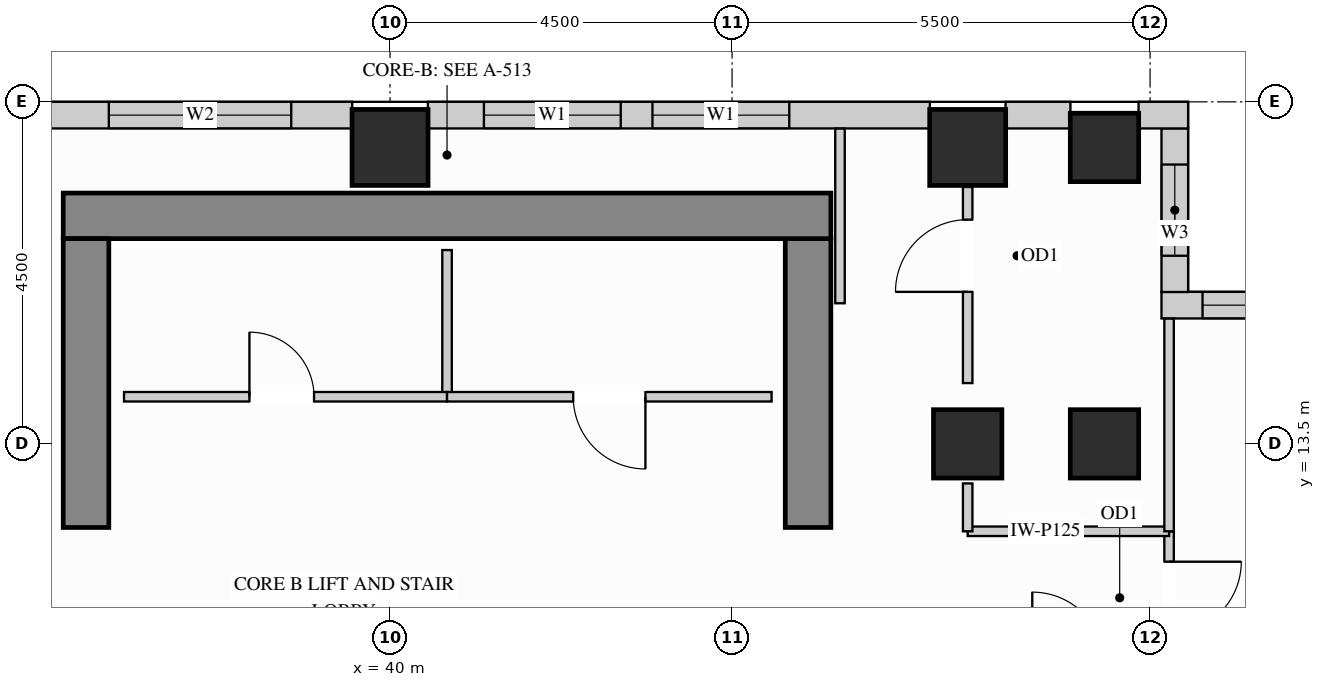
"""IFC4 building model, lengths in metres.
Left out: names, types, materials, properties, quantities, classifications, styles, units other than length and angle.
Written with IfcOpenShell. Run it as: python <this file> out.ifc"""

import sys

from ifc_helpers import new_model, si_unit, direction, frame, frame_2d, origin, origin_2d, place, context, subcontext, project, spatial, rectangle, extrude, source, transform, mapped, element, fill, save


model = new_model("IFC4")
c1 = context("Model", 3, precision=1e-05, world=origin(), true_north=direction((0.0, 1.0)))
c2 = subcontext(c1, "Body", "Model", "MODEL_VIEW")
j1 = project(units=[si_unit("LENGTHUNIT", "METRE"), si_unit("PLANEANGLEUNIT", "RADIAN")], contexts=[c1])
p1 = place(None, origin())
s1 = spatial("IfcSite", under=j1, at=p1, CompositionType="ELEMENT")
p2 = place(p1, origin())
s2 = spatial("IfcBuilding", under=s1, at=p2, CompositionType="ELEMENT")
p3 = place(p2, frame((0.0, 0.0, 171.9)))
s3 = spatial("IfcBuildingStorey", under=s2, at=p3, CompositionType="ELEMENT", Elevation=171.9)
m1 = source(origin(), c2, "Body", "SweptSolid", [
    extrude(rectangle(XDim=0.9, YDim=0.9, at=origin_2d()), origin(), (0.0, 0.0, 1.0), 3.4),
])
for number, where, z_axis, x_axis in (
    (1, (47.6, 13.5, 0.0), (0.0, 0.0, 1.0), (1.0, 0.0, 0.0)),
    (2, (49.4, 13.5, 0.0), (0.0, 0.0, 1.0), (1.0, 0.0, 0.0)),
    (3, (49.4, 17.4, 0.0), (0.0, 0.0, 1.0), (1.0, 0.0, 0.0)),
):
    element("IfcColumn", number, at=place(p3, frame(where, z_axis=z_axis, x_axis=x_axis)), inside=s3, PredefinedType="COLUMN", context=c2, shape_type="MappedRepresentation", body=[
        mapped(m1, transform((0.0, 0.0, 0.0), x_axis=(1.0, 0.0, 0.0), y_axis=(0.0, 1.0, 0.0), z_axis=(0.0, 0.0, 1.0))),
    ])
m2 = source(origin(), c2, "Body", "SweptSolid", [
    extrude(rectangle(XDim=1.0, YDim=1.0, at=origin_2d()), origin(), (0.0, 0.0, 1.0), 3.4),
])
for number, where, z_axis, x_axis in (
    (4, (40.0, 17.4, 0.0), (0.0, 0.0, 1.0), (1.0, 0.0, 0.0)),
    (5, (47.6, 17.4, 0.0), (0.0, 0.0, 1.0), (1.0, 0.0, 0.0)),
):
    element("IfcColumn", number, at=place(p3, frame(where, z_axis=z_axis, x_axis=x_axis)), inside=s3, PredefinedType="COLUMN", context=c2, shape_type="MappedRepresentation", body=[
        mapped(m2, transform((0.0, 0.0, 0.0), x_axis=(1.0, 0.0, 0.0), y_axis=(0.0, 1.0, 0.0), z_axis=(0.0, 0.0, 1.0))),
    ])
m3 = source(origin(), c2, "Body", "SweptSolid", [
    extrude(rectangle(XDim=3.8, YDim=0.6, at=frame_2d((1.9, 0.0))), origin(), (0.0, 0.0, 1.0), 3.4),
])
p4 = place(p3, frame((45.5, 12.4, 0.0), z_axis=(0.0, 0.0, 1.0), x_axis=(0.0, 1.0, 0.0)))
e6 = element("IfcWall", 6, at=p4, inside=s3, PredefinedType="SHEAR", context=c2, shape_type="MappedRepresentation", body=[
    mapped(m3, transform((0.0, 0.0, 0.0), x_axis=(1.0, 0.0, 0.0), y_axis=(0.0, 1.0, 0.0), z_axis=(0.0, 0.0, 1.0))),
])
m4 = source(origin(), c2, "Body", "SweptSolid", [
    extrude(rectangle(XDim=10.1, YDim=0.6, at=frame_2d((5.05, 0.0))), origin(), (0.0, 0.0, 1.0), 3.4),
])
p5 = place(p3, frame((35.7, 16.5, 0.0), z_axis=(0.0, 0.0, 1.0), x_axis=(1.0, 0.0, 0.0)))
e7 = element("IfcWall", 7, at=p5, inside=s3, PredefinedType="SHEAR", context=c2, shape_type="MappedRepresentation", body=[
    mapped(m4, transform((0.0, 0.0, 0.0), x_axis=(1.0, 0.0, 0.0), y_axis=(0.0, 1.0, 0.0), z_axis=(0.0, 0.0, 1.0))),
])
p6 = place(p3, frame((36.0, 12.4, 0.0), z_axis=(0.0, 0.0, 1.0), x_axis=(0.0, 1.0, 0.0)))
e8 = element("IfcWall", 8, at=p6, inside=s3, PredefinedType="SHEAR", context=c2, shape_type="MappedRepresentation", body=[
    mapped(m3, transform((0.0, 0.0, 0.0), x_axis=(1.0, 0.0, 0.0), y_axis=(0.0, 1.0, 0.0), z_axis=(0.0, 0.0, 1.0))),
])
p7 = place(p3, frame((53.0, 15.325, 0.0), z_axis=(0.0, 0.0, 1.0), x_axis=(-1.0, 0.0, 0.0)))
e9 = element("IfcWall", 9, at=p7, inside=s3, PredefinedType="SOLIDWALL", context=c2, shape_type="SweptSolid", body=[
    extrude(rectangle(XDim=2.85, YDim=0.35, at=frame_2d((1.425, 0.0))), origin(), (0.0, 0.0, 1.0), 3.385),
])
p8 = place(p7, frame((0.51, 0.0, 0.78)))
e10 = element("IfcOpeningElement", 10, at=p8, cuts=e9, PredefinedType="OPENING", context=c2, shape_type="SweptSolid", body=[
    extrude(rectangle(XDim=1.8, YDim=2.1, at=frame_2d((0.9, 1.05))), frame((0.0, 0.185, 0.0), z_axis=(0.0, -1.0, 0.0), x_axis=(1.0, 0.0, 0.0)), (0.0, 0.0, 1.0), 0.37),
])
p9 = place(p3, frame((50.325, 15.498, 0.0), z_axis=(0.0, 0.0, 1.0), x_axis=(0.0, 1.0, 0.0)))
e11 = element("IfcWall", 11, at=p9, inside=s3, PredefinedType="SOLIDWALL", context=c2, shape_type="SweptSolid", body=[
    extrude(rectangle(XDim=2.154, YDim=0.35, at=frame_2d((1.077, 0.0))), origin(), (0.0, 0.0, 1.0), 3.385),
])
p10 = place(p9, frame((0.477, 0.0, 0.78)))
e12 = element("IfcOpeningElement", 12, at=p10, cuts=e11, PredefinedType="OPENING", context=c2, shape_type="SweptSolid", body=[
    extrude(rectangle(XDim=1.2, YDim=2.1, at=frame_2d((0.6, 1.05))), frame((0.0, 0.185, 0.0), z_axis=(0.0, -1.0, 0.0), x_axis=(1.0, 0.0, 0.0)), (0.0, 0.0, 1.0), 0.37),
])
m5 = source(origin(), c2, "Body", "SweptSolid", [
    extrude(rectangle(XDim=0.652, YDim=0.35, at=frame_2d((0.326, 0.0))), origin(), (0.0, 0.0, 1.0), 3.385),
])
p11 = place(p3, frame((50.5, 17.825, 0.0), z_axis=(0.0, 0.0, 1.0), x_axis=(-1.0, 0.0, 0.0)))
e13 = element("IfcWall", 13, at=p11, inside=s3, PredefinedType="SOLIDWALL", context=c2, shape_type="MappedRepresentation", body=[
    mapped(m5, transform((0.0, 0.0, 0.0), x_axis=(1.0, 0.0, 0.0), y_axis=(0.0, 1.0, 0.0), z_axis=(0.0, 0.0, 1.0))),
])
m6 = source(origin(), c2, "Body", "SweptSolid", [
    extrude(rectangle(XDim=0.854, YDim=0.35, at=frame_2d((0.427, 0.0))), origin(), (0.0, 0.0, 1.0), 3.385),
])
p12 = place(p3, frame((48.952, 17.825, 0.0), z_axis=(0.0, 0.0, 1.0), x_axis=(-1.0, 0.0, 0.0)))
e14 = element("IfcWall", 14, at=p12, inside=s3, PredefinedType="SOLIDWALL", context=c2, shape_type="MappedRepresentation", body=[
    mapped(m6, transform((0.0, 0.0, 0.0), x_axis=(1.0, 0.0, 0.0), y_axis=(0.0, 1.0, 0.0), z_axis=(0.0, 0.0, 1.0))),
])
p13 = place(p3, frame((47.102, 17.825, 0.0), z_axis=(0.0, 0.0, 1.0), x_axis=(-1.0, 0.0, 0.0)))
e15 = element("IfcWall", 15, at=p13, inside=s3, PredefinedType="SOLIDWALL", context=c2, shape_type="SweptSolid", body=[
    extrude(rectangle(XDim=6.604, YDim=0.35, at=frame_2d((3.302, 0.0))), origin(), (0.0, 0.0, 1.0), 2.612),
])
p14 = place(p13, frame((1.849, 0.0, 0.78)))
e16 = element("IfcOpeningElement", 16, at=p14, cuts=e15, PredefinedType="OPENING", context=c2, shape_type="SweptSolid", body=[
    extrude(rectangle(XDim=1.8, YDim=1.652, at=frame_2d((0.9, 0.826))), frame((0.0, 0.185, 0.0), z_axis=(0.0, -1.0, 0.0), x_axis=(1.0, 0.0, 0.0)), (0.0, 0.0, 1.0), 0.37),
])
p15 = place(p13, frame((4.067, 0.0, 0.78)))
e17 = element("IfcOpeningElement", 17, at=p15, cuts=e15, PredefinedType="OPENING", context=c2, shape_type="SweptSolid", body=[
    extrude(rectangle(XDim=1.8, YDim=1.652, at=frame_2d((0.9, 0.826))), frame((0.0, 0.185, 0.0), z_axis=(0.0, -1.0, 0.0), x_axis=(1.0, 0.0, 0.0)), (0.0, 0.0, 1.0), 0.37),
])
p16 = place(p3, frame((39.502, 17.825, 0.0), z_axis=(0.0, 0.0, 1.0), x_axis=(-1.0, 0.0, 0.0)))
e18 = element("IfcWall", 18, at=p16, inside=s3, PredefinedType="SOLIDWALL", context=c2, shape_type="SweptSolid", body=[
    extrude(rectangle(XDim=4.004, YDim=0.35, at=frame_2d((2.002, 0.0))), origin(), (0.0, 0.0, 1.0), 2.612),
])
p17 = place(p16, frame((0.802, 0.0, 0.78)))
e19 = element("IfcOpeningElement", 19, at=p17, cuts=e18, PredefinedType="OPENING", context=c2, shape_type="SweptSolid", body=[
    extrude(rectangle(XDim=2.4, YDim=1.652, at=frame_2d((1.2, 0.826))), frame((0.0, 0.185, 0.0), z_axis=(0.0, -1.0, 0.0), x_axis=(1.0, 0.0, 0.0)), (0.0, 0.0, 1.0), 0.37),
])
m7 = source(origin(), c2, "Body", "SweptSolid", [
    extrude(rectangle(XDim=1.93, YDim=0.125, at=frame_2d((0.965, 0.0))), origin(), (0.0, 0.0, 1.0), 3.385),
])
p18 = place(p3, frame((40.75, 14.12, 0.0), z_axis=(0.0, 0.0, 1.0), x_axis=(0.0, 1.0, 0.0)))
e20 = element("IfcWall", 20, at=p18, inside=s3, PredefinedType="PARTITIONING", context=c2, shape_type="MappedRepresentation", body=[
    mapped(m7, transform((0.0, 0.0, 0.0), x_axis=(1.0, 0.0, 0.0), y_axis=(0.0, 1.0, 0.0), z_axis=(0.0, 0.0, 1.0))),
])
p19 = place(p3, frame((36.5, 14.12, 0.0), z_axis=(0.0, 0.0, 1.0), x_axis=(1.0, 0.0, 0.0)))
e21 = element("IfcWall", 21, at=p19, inside=s3, PredefinedType="PARTITIONING", context=c2, shape_type="SweptSolid", body=[
    extrude(rectangle(XDim=4.25, YDim=0.125, at=frame_2d((2.125, 0.0))), origin(), (0.0, 0.0, 1.0), 3.385),
])
p20 = place(p19, frame((1.65, 0.0, 0.0)))
e22 = element("IfcOpeningElement", 22, at=p20, cuts=e21, PredefinedType="OPENING", context=c2, shape_type="SweptSolid", body=[
    extrude(rectangle(XDim=0.85, YDim=2.1, at=frame_2d((0.425, 1.05))), frame((0.0, 0.073, 0.0), z_axis=(0.0, -1.0, 0.0), x_axis=(1.0, 0.0, 0.0)), (0.0, 0.0, 1.0), 0.145),
])
p21 = place(p3, frame((40.75, 14.12, 0.0), z_axis=(0.0, 0.0, 1.0), x_axis=(1.0, 0.0, 0.0)))
e23 = element("IfcWall", 23, at=p21, inside=s3, PredefinedType="PARTITIONING", context=c2, shape_type="SweptSolid", body=[
    extrude(rectangle(XDim=4.27, YDim=0.125, at=frame_2d((2.135, 0.0))), origin(), (0.0, 0.0, 1.0), 3.385),
])
p22 = place(p21, frame((1.66, 0.0, 0.0)))
e24 = element("IfcOpeningElement", 24, at=p22, cuts=e23, PredefinedType="OPENING", context=c2, shape_type="SweptSolid", body=[
    extrude(rectangle(XDim=0.95, YDim=2.15, at=frame_2d((0.475, 1.075))), frame((0.0, 0.073, 0.0), z_axis=(0.0, -1.0, 0.0), x_axis=(1.0, 0.0, 0.0)), (0.0, 0.0, 1.0), 0.145),
])
p23 = place(p3, frame((50.25, 10.6, 0.0), z_axis=(0.0, 0.0, 1.0), x_axis=(0.0, 1.0, 0.0)))
e25 = element("IfcWall", 25, at=p23, inside=s3, PredefinedType="PARTITIONING", context=c2, shape_type="SweptSolid", body=[
    extrude(rectangle(XDim=1.75, YDim=0.125, at=frame_2d((0.875, 0.0))), origin(), (0.0, 0.0, 1.0), 3.385),
])
p24 = place(p23, frame((0.4, 0.0, 0.0)))
e26 = element("IfcOpeningElement", 26, at=p24, cuts=e25, PredefinedType="OPENING", context=c2, shape_type="SweptSolid", body=[
    extrude(rectangle(XDim=0.95, YDim=2.15, at=frame_2d((0.475, 1.075))), frame((0.0, 0.073, 0.0), z_axis=(0.0, -1.0, 0.0), x_axis=(1.0, 0.0, 0.0)), (0.0, 0.0, 1.0), 0.145),
])
m8 = source(origin(), c2, "Body", "SweptSolid", [
    extrude(rectangle(XDim=2.65, YDim=0.125, at=frame_2d((1.325, 0.0))), origin(), (0.0, 0.0, 1.0), 3.385),
])
p25 = place(p3, frame((47.6, 12.35, 0.0), z_axis=(0.0, 0.0, 1.0), x_axis=(1.0, 0.0, 0.0)))
e27 = element("IfcWall", 27, at=p25, inside=s3, PredefinedType="PARTITIONING", context=c2, shape_type="MappedRepresentation", body=[
    mapped(m8, transform((0.0, 0.0, 0.0), x_axis=(1.0, 0.0, 0.0), y_axis=(0.0, 1.0, 0.0), z_axis=(0.0, 0.0, 1.0))),
])
m9 = source(origin(), c2, "Body", "SweptSolid", [
    extrude(rectangle(XDim=2.798, YDim=0.125, at=frame_2d((1.399, 0.0))), origin(), (0.0, 0.0, 1.0), 3.385),
])
p26 = place(p3, frame((50.25, 12.35, 0.0), z_axis=(0.0, 0.0, 1.0), x_axis=(0.0, 1.0, 0.0)))
e28 = element("IfcWall", 28, at=p26, inside=s3, PredefinedType="PARTITIONING", context=c2, shape_type="MappedRepresentation", body=[
    mapped(m9, transform((0.0, 0.0, 0.0), x_axis=(1.0, 0.0, 0.0), y_axis=(0.0, 1.0, 0.0), z_axis=(0.0, 0.0, 1.0))),
])
p27 = place(p3, frame((47.6, 14.3, 0.0), z_axis=(0.0, 0.0, 1.0), x_axis=(0.0, 1.0, 0.0)))
e29 = element("IfcWall", 29, at=p27, inside=s3, PredefinedType="PARTITIONING", context=c2, shape_type="SweptSolid", body=[
    extrude(rectangle(XDim=2.58, YDim=0.125, at=frame_2d((1.29, 0.0))), origin(), (0.0, 0.0, 1.0), 2.773),
])
p28 = place(p27, frame((1.2, 0.0, 0.0)))
e30 = element("IfcOpeningElement", 30, at=p28, cuts=e29, PredefinedType="OPENING", context=c2, shape_type="SweptSolid", body=[
    extrude(rectangle(XDim=0.95, YDim=2.15, at=frame_2d((0.475, 1.075))), frame((0.0, 0.073, 0.0), z_axis=(0.0, -1.0, 0.0), x_axis=(1.0, 0.0, 0.0)), (0.0, 0.0, 1.0), 0.145),
])
m10 = source(origin(), c2, "Body", "SweptSolid", [
    extrude(rectangle(XDim=0.63, YDim=0.125, at=frame_2d((0.315, 0.0))), origin(), (0.0, 0.0, 1.0), 2.773),
])
p29 = place(p3, frame((47.6, 12.35, 0.0), z_axis=(0.0, 0.0, 1.0), x_axis=(0.0, 1.0, 0.0)))
e31 = element("IfcWall", 31, at=p29, inside=s3, PredefinedType="PARTITIONING", context=c2, shape_type="MappedRepresentation", body=[
    mapped(m10, transform((0.0, 0.0, 0.0), x_axis=(1.0, 0.0, 0.0), y_axis=(0.0, 1.0, 0.0), z_axis=(0.0, 0.0, 1.0))),
])
m11 = source(origin(), c2, "Body", "SweptSolid", [
    extrude(rectangle(XDim=2.298, YDim=0.125, at=frame_2d((1.149, 0.0))), origin(), (0.0, 0.0, 1.0), 3.385),
])
p30 = place(p3, frame((45.92, 15.35, 0.0), z_axis=(0.0, 0.0, 1.0), x_axis=(0.0, 1.0, 0.0)))
e32 = element("IfcWall", 32, at=p30, inside=s3, PredefinedType="PARTITIONING", context=c2, shape_type="MappedRepresentation", body=[
    mapped(m11, transform((0.0, 0.0, 0.0), x_axis=(1.0, 0.0, 0.0), y_axis=(0.0, 1.0, 0.0), z_axis=(0.0, 0.0, 1.0))),
])
m12 = source(origin(), c2, "Body", "SweptSolid", [
    extrude(rectangle(XDim=0.95, YDim=2.15, at=frame_2d((0.475, 1.075))), frame((0.0, 0.025, 0.0), z_axis=(0.0, -1.0, 0.0), x_axis=(1.0, 0.0, 0.0)), (0.0, 0.0, 1.0), 0.05),
])
p31 = place(p22, origin())
e33 = element("IfcDoor", 33, at=p31, inside=s3, OperationType="SINGLE_SWING_RIGHT", PredefinedType="DOOR", context=c2, shape_type="MappedRepresentation", body=[
    mapped(m12, transform((0.0, 0.0, 0.0), x_axis=(1.0, 0.0, 0.0), y_axis=(0.0, 1.0, 0.0), z_axis=(0.0, 0.0, 1.0))),
])
fill(e24, e33)
p32 = place(p24, origin())
e34 = element("IfcDoor", 34, at=p32, inside=s3, OperationType="SINGLE_SWING_RIGHT", PredefinedType="DOOR", context=c2, shape_type="MappedRepresentation", body=[
    mapped(m12, transform((0.0, 0.0, 0.0), x_axis=(1.0, 0.0, 0.0), y_axis=(0.0, 1.0, 0.0), z_axis=(0.0, 0.0, 1.0))),
])
fill(e26, e34)
p33 = place(p28, origin())
e35 = element("IfcDoor", 35, at=p33, inside=s3, OperationType="SINGLE_SWING_LEFT", PredefinedType="DOOR", context=c2, shape_type="MappedRepresentation", body=[
    mapped(m12, transform((0.0, 0.0, 0.0), x_axis=(1.0, 0.0, 0.0), y_axis=(0.0, 1.0, 0.0), z_axis=(0.0, 0.0, 1.0))),
])
fill(e30, e35)
m13 = source(origin(), c2, "Body", "SweptSolid", [
    extrude(rectangle(XDim=0.85, YDim=2.1, at=frame_2d((0.425, 1.05))), frame((0.0, 0.025, 0.0), z_axis=(0.0, -1.0, 0.0), x_axis=(1.0, 0.0, 0.0)), (0.0, 0.0, 1.0), 0.05),
])
p34 = place(p20, origin())
e36 = element("IfcDoor", 36, at=p34, inside=s3, OperationType="SINGLE_SWING_LEFT", PredefinedType="DOOR", context=c2, shape_type="MappedRepresentation", body=[
    mapped(m13, transform((0.0, 0.0, 0.0), x_axis=(1.0, 0.0, 0.0), y_axis=(0.0, 1.0, 0.0), z_axis=(0.0, 0.0, 1.0))),
])
fill(e22, e36)
m14 = source(origin(), c2, "Body", "SweptSolid", [
    extrude(rectangle(XDim=1.8, YDim=2.1, at=frame_2d((0.9, 1.05))), frame((0.0, 0.03, 0.0), z_axis=(0.0, -1.0, 0.0), x_axis=(1.0, 0.0, 0.0)), (0.0, 0.0, 1.0), 0.06),
])
p35 = place(p8, origin())
e37 = element("IfcWindow", 37, at=p35, inside=s3, PartitioningType="SINGLE_PANEL", PredefinedType="WINDOW", context=c2, shape_type="MappedRepresentation", body=[
    mapped(m14, transform((0.0, 0.0, 0.0), x_axis=(1.0, 0.0, 0.0), y_axis=(0.0, 1.0, 0.0), z_axis=(0.0, 0.0, 1.0))),
])
fill(e10, e37)
m15 = source(origin(), c2, "Body", "SweptSolid", [
    extrude(rectangle(XDim=1.8, YDim=1.652, at=frame_2d((0.9, 0.826))), frame((0.0, 0.03, 0.0), z_axis=(0.0, -1.0, 0.0), x_axis=(1.0, 0.0, 0.0)), (0.0, 0.0, 1.0), 0.06),
])
p36 = place(p14, origin())
e38 = element("IfcWindow", 38, at=p36, inside=s3, PartitioningType="SINGLE_PANEL", PredefinedType="WINDOW", context=c2, shape_type="MappedRepresentation", body=[
    mapped(m15, transform((0.0, 0.0, 0.0), x_axis=(1.0, 0.0, 0.0), y_axis=(0.0, 1.0, 0.0), z_axis=(0.0, 0.0, 1.0))),
])
fill(e16, e38)
p37 = place(p15, origin())
e39 = element("IfcWindow", 39, at=p37, inside=s3, PartitioningType="SINGLE_PANEL", PredefinedType="WINDOW", context=c2, shape_type="MappedRepresentation", body=[
    mapped(m15, transform((0.0, 0.0, 0.0), x_axis=(1.0, 0.0, 0.0), y_axis=(0.0, 1.0, 0.0), z_axis=(0.0, 0.0, 1.0))),
])
fill(e17, e39)
m16 = source(origin(), c2, "Body", "SweptSolid", [
    extrude(rectangle(XDim=2.4, YDim=1.652, at=frame_2d((1.2, 0.826))), frame((0.0, 0.03, 0.0), z_axis=(0.0, -1.0, 0.0), x_axis=(1.0, 0.0, 0.0)), (0.0, 0.0, 1.0), 0.06),
])
p38 = place(p17, origin())
e40 = element("IfcWindow", 40, at=p38, inside=s3, PartitioningType="SINGLE_PANEL", PredefinedType="WINDOW", context=c2, shape_type="MappedRepresentation", body=[
    mapped(m16, transform((0.0, 0.0, 0.0), x_axis=(1.0, 0.0, 0.0), y_axis=(0.0, 1.0, 0.0), z_axis=(0.0, 0.0, 1.0))),
])
fill(e19, e40)
m17 = source(origin(), c2, "Body", "SweptSolid", [
    extrude(rectangle(XDim=1.2, YDim=2.1, at=frame_2d((0.6, 1.05))), frame((0.0, 0.03, 0.0), z_axis=(0.0, -1.0, 0.0), x_axis=(1.0, 0.0, 0.0)), (0.0, 0.0, 1.0), 0.06),
])
p39 = place(p10, origin())
e41 = element("IfcWindow", 41, at=p39, inside=s3, PartitioningType="SINGLE_PANEL", PredefinedType="WINDOW", context=c2, shape_type="MappedRepresentation", body=[
    mapped(m17, transform((0.0, 0.0, 0.0), x_axis=(1.0, 0.0, 0.0), y_axis=(0.0, 1.0, 0.0), z_axis=(0.0, 0.0, 1.0))),
])
fill(e12, e41)
save(model, sys.argv[1])
